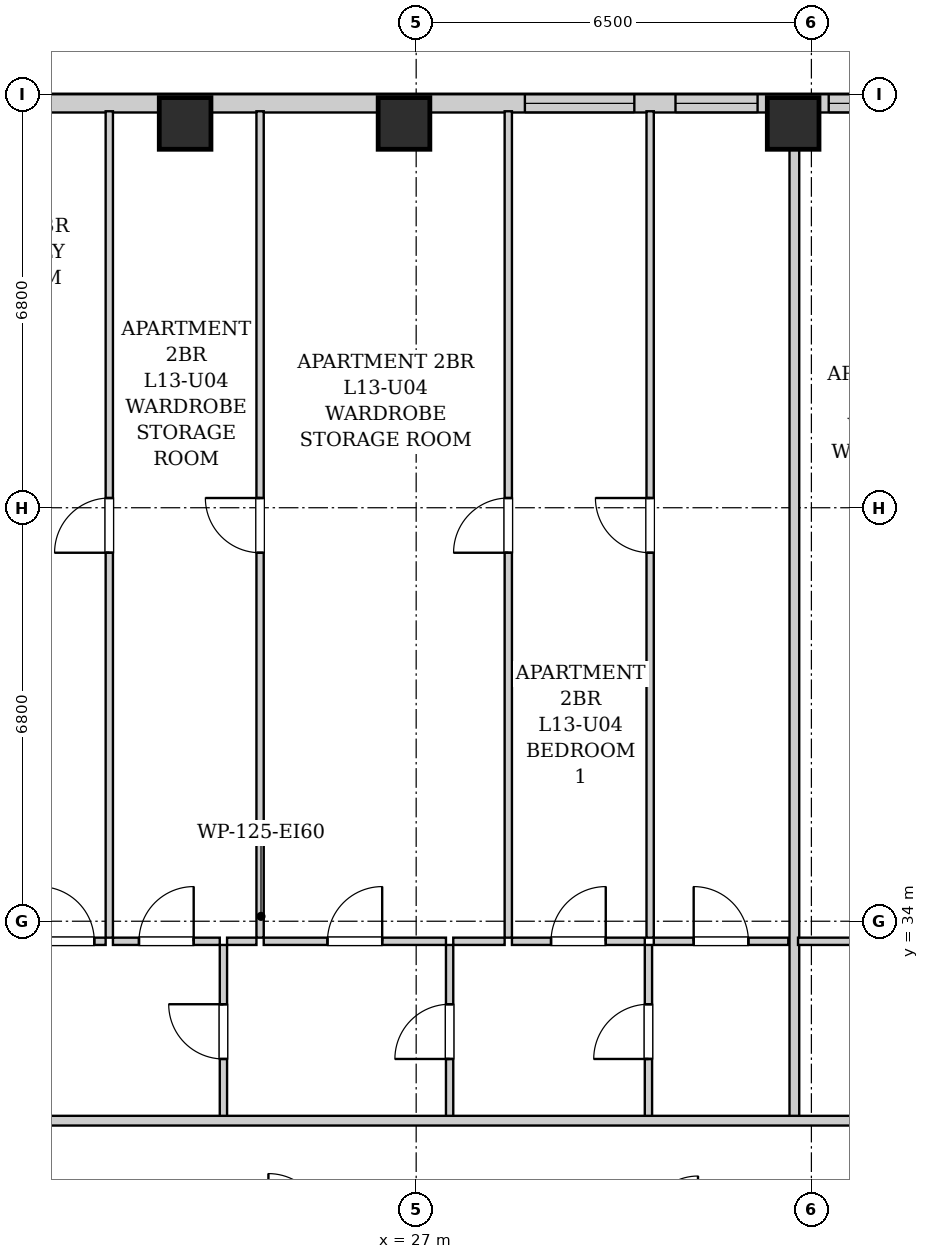
"""IFC4 building model, lengths in metres.
Left out: names, types, materials, properties, quantities, classifications, styles, units other than length and angle.
Written with IfcOpenShell. Run it as: python <this file> out.ifc"""

import sys

from ifc_helpers import new_model, si_unit, direction, frame, frame_2d, origin, origin_2d, place, context, subcontext, project, spatial, rectangle, extrude, element, fill, save


model = new_model("IFC4")
c1 = context("Model", 3, precision=1e-05, world=origin(), true_north=direction((0.0, 1.0)))
c2 = subcontext(c1, "Body", "Model", "MODEL_VIEW")
j1 = project(units=[si_unit("LENGTHUNIT", "METRE"), si_unit("PLANEANGLEUNIT", "RADIAN")], contexts=[c1])
p1 = place(None, origin())
s1 = spatial("IfcSite", under=j1, at=p1, CompositionType="ELEMENT")
p2 = place(p1, origin())
s2 = spatial("IfcBuilding", under=s1, at=p2, CompositionType="ELEMENT")
p3 = place(p2, frame((0.0, 0.0, 51.4)))
s3 = spatial("IfcBuildingStorey", under=s2, at=p3, CompositionType="ELEMENT", Elevation=51.4)
for number, where, z_axis, x_axis in (
    (1, (23.2, 47.12, 0.0), (0.0, 0.0, 1.0), (1.0, 0.0, 0.0)),
    (2, (26.8, 47.12, 0.0), (0.0, 0.0, 1.0), (1.0, 0.0, 0.0)),
    (3, (33.2, 47.12, 0.0), (0.0, 0.0, 1.0), (1.0, 0.0, 0.0)),
):
    element("IfcColumn", number, at=place(p3, frame(where, z_axis=z_axis, x_axis=x_axis)), inside=s3, PredefinedType="COLUMN", context=c2, shape_type="SweptSolid", body=[
        extrude(rectangle(XDim=0.85, YDim=0.85, at=origin_2d()), origin(), (0.0, 0.0, 1.0), 3.2),
    ])
p4 = place(p3, frame((10.0, 47.45, 0.0), z_axis=(0.0, 0.0, 1.0), x_axis=(1.0, 0.0, 0.0)))
e4 = element("IfcWall", 4, at=p4, inside=s3, PredefinedType="SOLIDWALL", context=c2, shape_type="SweptSolid", body=[
    extrude(rectangle(XDim=26.15, YDim=0.3, at=frame_2d((13.075, 0.0))), origin(), (0.0, 0.0, 1.0), 1.975),
])
p5 = place(p4, frame((5.862, 0.0, 0.55)))
e5 = element("IfcOpeningElement", 5, at=p5, cuts=e4, PredefinedType="OPENING", context=c2, shape_type="SweptSolid", body=[
    extrude(rectangle(XDim=1.35, YDim=1.2, at=frame_2d((0.675, 0.6))), frame((0.0, 0.16, 0.0), z_axis=(0.0, -1.0, 0.0), x_axis=(1.0, 0.0, 0.0)), (0.0, 0.0, 1.0), 0.32),
])
p6 = place(p4, frame((8.944, 0.0, 0.55)))
e6 = element("IfcOpeningElement", 6, at=p6, cuts=e4, PredefinedType="OPENING", context=c2, shape_type="SweptSolid", body=[
    extrude(rectangle(XDim=1.8, YDim=1.2, at=frame_2d((0.9, 0.6))), frame((0.0, 0.16, 0.0), z_axis=(0.0, -1.0, 0.0), x_axis=(1.0, 0.0, 0.0)), (0.0, 0.0, 1.0), 0.32),
])
p7 = place(p4, frame((18.788, 0.0, 0.55)))
e7 = element("IfcOpeningElement", 7, at=p7, cuts=e4, PredefinedType="OPENING", context=c2, shape_type="SweptSolid", body=[
    extrude(rectangle(XDim=1.8, YDim=1.2, at=frame_2d((0.9, 0.6))), frame((0.0, 0.16, 0.0), z_axis=(0.0, -1.0, 0.0), x_axis=(1.0, 0.0, 0.0)), (0.0, 0.0, 1.0), 0.32),
])
p8 = place(p4, frame((21.265, 0.0, 0.55)))
e8 = element("IfcOpeningElement", 8, at=p8, cuts=e4, PredefinedType="OPENING", context=c2, shape_type="SweptSolid", body=[
    extrude(rectangle(XDim=1.35, YDim=1.2, at=frame_2d((0.675, 0.6))), frame((0.0, 0.16, 0.0), z_axis=(0.0, -1.0, 0.0), x_axis=(1.0, 0.0, 0.0)), (0.0, 0.0, 1.0), 0.32),
])
p9 = place(p4, frame((23.785, 0.0, 0.55)))
e9 = element("IfcOpeningElement", 9, at=p9, cuts=e4, PredefinedType="OPENING", context=c2, shape_type="SweptSolid", body=[
    extrude(rectangle(XDim=1.8, YDim=1.2, at=frame_2d((0.9, 0.6))), frame((0.0, 0.16, 0.0), z_axis=(0.0, -1.0, 0.0), x_axis=(1.0, 0.0, 0.0)), (0.0, 0.0, 1.0), 0.32),
])
p10 = place(p3, frame((23.83, 30.76, 0.0), z_axis=(0.0, 0.0, 1.0), x_axis=(0.0, 1.0, 0.0)))
e10 = element("IfcWall", 10, at=p10, inside=s3, PredefinedType="PARTITIONING", context=c2, shape_type="SweptSolid", body=[
    extrude(rectangle(XDim=2.85, YDim=0.12, at=frame_2d((1.425, 0.0))), origin(), (0.0, 0.0, 1.0), 2.94),
])
p11 = place(p10, frame((0.975, 0.0, 0.0)))
e11 = element("IfcOpeningElement", 11, at=p11, cuts=e10, PredefinedType="OPENING", context=c2, shape_type="SweptSolid", body=[
    extrude(rectangle(XDim=0.9, YDim=2.05, at=frame_2d((0.45, 1.025))), frame((0.0, 0.07, 0.0), z_axis=(0.0, -1.0, 0.0), x_axis=(1.0, 0.0, 0.0)), (0.0, 0.0, 1.0), 0.14),
])
p12 = place(p3, frame((20.62, 33.67, 0.0), z_axis=(0.0, 0.0, 1.0), x_axis=(1.0, 0.0, 0.0)))
e12 = element("IfcWall", 12, at=p12, inside=s3, PredefinedType="PARTITIONING", context=c2, shape_type="SweptSolid", body=[
    extrude(rectangle(XDim=1.273, YDim=0.12, at=frame_2d((0.636, 0.0))), origin(), (0.0, 0.0, 1.0), 2.94),
])
p13 = place(p12, frame((0.186, 0.0, 0.0)))
e13 = element("IfcOpeningElement", 13, at=p13, cuts=e12, PredefinedType="OPENING", context=c2, shape_type="SweptSolid", body=[
    extrude(rectangle(XDim=0.9, YDim=2.05, at=frame_2d((0.45, 1.025))), frame((0.0, 0.07, 0.0), z_axis=(0.0, -1.0, 0.0), x_axis=(1.0, 0.0, 0.0)), (0.0, 0.0, 1.0), 0.14),
])
p14 = place(p3, frame((22.013, 33.67, 0.0), z_axis=(0.0, 0.0, 1.0), x_axis=(1.0, 0.0, 0.0)))
e14 = element("IfcWall", 14, at=p14, inside=s3, PredefinedType="PARTITIONING", context=c2, shape_type="SweptSolid", body=[
    extrude(rectangle(XDim=1.757, YDim=0.12, at=frame_2d((0.878, 0.0))), origin(), (0.0, 0.0, 1.0), 2.94),
])
p15 = place(p14, frame((0.428, 0.0, 0.0)))
e15 = element("IfcOpeningElement", 15, at=p15, cuts=e14, PredefinedType="OPENING", context=c2, shape_type="SweptSolid", body=[
    extrude(rectangle(XDim=0.9, YDim=2.05, at=frame_2d((0.45, 1.025))), frame((0.0, 0.07, 0.0), z_axis=(0.0, -1.0, 0.0), x_axis=(1.0, 0.0, 0.0)), (0.0, 0.0, 1.0), 0.14),
])
p16 = place(p3, frame((27.55, 30.76, 0.0), z_axis=(0.0, 0.0, 1.0), x_axis=(0.0, 1.0, 0.0)))
e16 = element("IfcWall", 16, at=p16, inside=s3, PredefinedType="PARTITIONING", context=c2, shape_type="SweptSolid", body=[
    extrude(rectangle(XDim=2.85, YDim=0.12, at=frame_2d((1.425, 0.0))), origin(), (0.0, 0.0, 1.0), 2.94),
])
p17 = place(p16, frame((0.975, 0.0, 0.0)))
e17 = element("IfcOpeningElement", 17, at=p17, cuts=e16, PredefinedType="OPENING", context=c2, shape_type="SweptSolid", body=[
    extrude(rectangle(XDim=0.9, YDim=2.05, at=frame_2d((0.45, 1.025))), frame((0.0, 0.07, 0.0), z_axis=(0.0, -1.0, 0.0), x_axis=(1.0, 0.0, 0.0)), (0.0, 0.0, 1.0), 0.14),
])
p18 = place(p3, frame((23.89, 33.67, 0.0), z_axis=(0.0, 0.0, 1.0), x_axis=(1.0, 0.0, 0.0)))
e18 = element("IfcWall", 18, at=p18, inside=s3, PredefinedType="PARTITIONING", context=c2, shape_type="SweptSolid", body=[
    extrude(rectangle(XDim=0.483, YDim=0.12, at=frame_2d((0.242, 0.0))), origin(), (0.0, 0.0, 1.0), 2.94),
])
p19 = place(p3, frame((24.493, 33.67, 0.0), z_axis=(0.0, 0.0, 1.0), x_axis=(1.0, 0.0, 0.0)))
e19 = element("IfcWall", 19, at=p19, inside=s3, PredefinedType="PARTITIONING", context=c2, shape_type="SweptSolid", body=[
    extrude(rectangle(XDim=2.997, YDim=0.12, at=frame_2d((1.499, 0.0))), origin(), (0.0, 0.0, 1.0), 2.94),
])
p20 = place(p19, frame((1.048, 0.0, 0.0)))
e20 = element("IfcOpeningElement", 20, at=p20, cuts=e19, PredefinedType="OPENING", context=c2, shape_type="SweptSolid", body=[
    extrude(rectangle(XDim=0.9, YDim=2.05, at=frame_2d((0.45, 1.025))), frame((0.0, 0.07, 0.0), z_axis=(0.0, -1.0, 0.0), x_axis=(1.0, 0.0, 0.0)), (0.0, 0.0, 1.0), 0.14),
])
p21 = place(p3, frame((30.82, 30.76, 0.0), z_axis=(0.0, 0.0, 1.0), x_axis=(0.0, 1.0, 0.0)))
e21 = element("IfcWall", 21, at=p21, inside=s3, PredefinedType="PARTITIONING", context=c2, shape_type="SweptSolid", body=[
    extrude(rectangle(XDim=2.85, YDim=0.12, at=frame_2d((1.425, 0.0))), origin(), (0.0, 0.0, 1.0), 2.94),
])
p22 = place(p21, frame((0.975, 0.0, 0.0)))
e22 = element("IfcOpeningElement", 22, at=p22, cuts=e21, PredefinedType="OPENING", context=c2, shape_type="SweptSolid", body=[
    extrude(rectangle(XDim=0.9, YDim=2.05, at=frame_2d((0.45, 1.025))), frame((0.0, 0.07, 0.0), z_axis=(0.0, -1.0, 0.0), x_axis=(1.0, 0.0, 0.0)), (0.0, 0.0, 1.0), 0.14),
])
p23 = place(p3, frame((27.61, 33.67, 0.0), z_axis=(0.0, 0.0, 1.0), x_axis=(1.0, 0.0, 0.0)))
e23 = element("IfcWall", 23, at=p23, inside=s3, PredefinedType="PARTITIONING", context=c2, shape_type="SweptSolid", body=[
    extrude(rectangle(XDim=0.845, YDim=0.12, at=frame_2d((0.422, 0.0))), origin(), (0.0, 0.0, 1.0), 2.94),
])
p24 = place(p3, frame((28.575, 33.67, 0.0), z_axis=(0.0, 0.0, 1.0), x_axis=(1.0, 0.0, 0.0)))
e24 = element("IfcWall", 24, at=p24, inside=s3, PredefinedType="PARTITIONING", context=c2, shape_type="SweptSolid", body=[
    extrude(rectangle(XDim=2.185, YDim=0.12, at=frame_2d((1.093, 0.0))), origin(), (0.0, 0.0, 1.0), 2.94),
])
p25 = place(p24, frame((0.643, 0.0, 0.0)))
e25 = element("IfcOpeningElement", 25, at=p25, cuts=e24, PredefinedType="OPENING", context=c2, shape_type="SweptSolid", body=[
    extrude(rectangle(XDim=0.9, YDim=2.05, at=frame_2d((0.45, 1.025))), frame((0.0, 0.07, 0.0), z_axis=(0.0, -1.0, 0.0), x_axis=(1.0, 0.0, 0.0)), (0.0, 0.0, 1.0), 0.14),
])
p26 = place(p3, frame((30.908, 33.67, 0.0), z_axis=(0.0, 0.0, 1.0), x_axis=(1.0, 0.0, 0.0)))
e26 = element("IfcWall", 26, at=p26, inside=s3, PredefinedType="PARTITIONING", context=c2, shape_type="SweptSolid", body=[
    extrude(rectangle(XDim=2.212, YDim=0.12, at=frame_2d((1.106, 0.0))), origin(), (0.0, 0.0, 1.0), 2.94),
])
p27 = place(p26, frame((0.656, 0.0, 0.0)))
e27 = element("IfcOpeningElement", 27, at=p27, cuts=e26, PredefinedType="OPENING", context=c2, shape_type="SweptSolid", body=[
    extrude(rectangle(XDim=0.9, YDim=2.05, at=frame_2d((0.45, 1.025))), frame((0.0, 0.07, 0.0), z_axis=(0.0, -1.0, 0.0), x_axis=(1.0, 0.0, 0.0)), (0.0, 0.0, 1.0), 0.14),
])
p28 = place(p3, frame((21.953, 33.73, 0.0), z_axis=(0.0, 0.0, 1.0), x_axis=(0.0, 1.0, 0.0)))
e28 = element("IfcWall", 28, at=p28, inside=s3, PredefinedType="PARTITIONING", context=c2, shape_type="SweptSolid", body=[
    extrude(rectangle(XDim=13.59, YDim=0.12, at=frame_2d((6.795, 0.0))), origin(), (0.0, 0.0, 1.0), 2.94),
])
p29 = place(p28, frame((6.33, 0.0, 0.0)))
e29 = element("IfcOpeningElement", 29, at=p29, cuts=e28, PredefinedType="OPENING", context=c2, shape_type="SweptSolid", body=[
    extrude(rectangle(XDim=0.9, YDim=2.05, at=frame_2d((0.45, 1.025))), frame((0.0, 0.07, 0.0), z_axis=(0.0, -1.0, 0.0), x_axis=(1.0, 0.0, 0.0)), (0.0, 0.0, 1.0), 0.14),
])
p30 = place(p3, frame((24.433, 33.73, 0.0), z_axis=(0.0, 0.0, 1.0), x_axis=(0.0, 1.0, 0.0)))
e30 = element("IfcWall", 30, at=p30, inside=s3, PredefinedType="PARTITIONING", context=c2, shape_type="SweptSolid", body=[
    extrude(rectangle(XDim=13.59, YDim=0.12, at=frame_2d((6.795, 0.0))), origin(), (0.0, 0.0, 1.0), 2.94),
])
p31 = place(p30, frame((6.33, 0.0, 0.0)))
e31 = element("IfcOpeningElement", 31, at=p31, cuts=e30, PredefinedType="OPENING", context=c2, shape_type="SweptSolid", body=[
    extrude(rectangle(XDim=0.9, YDim=2.05, at=frame_2d((0.45, 1.025))), frame((0.0, 0.07, 0.0), z_axis=(0.0, -1.0, 0.0), x_axis=(1.0, 0.0, 0.0)), (0.0, 0.0, 1.0), 0.14),
])
p32 = place(p3, frame((28.515, 33.73, 0.0), z_axis=(0.0, 0.0, 1.0), x_axis=(0.0, 1.0, 0.0)))
e32 = element("IfcWall", 32, at=p32, inside=s3, PredefinedType="PARTITIONING", context=c2, shape_type="SweptSolid", body=[
    extrude(rectangle(XDim=13.59, YDim=0.12, at=frame_2d((6.795, 0.0))), origin(), (0.0, 0.0, 1.0), 2.94),
])
p33 = place(p32, frame((6.33, 0.0, 0.0)))
e33 = element("IfcOpeningElement", 33, at=p33, cuts=e32, PredefinedType="OPENING", context=c2, shape_type="SweptSolid", body=[
    extrude(rectangle(XDim=0.9, YDim=2.05, at=frame_2d((0.45, 1.025))), frame((0.0, 0.07, 0.0), z_axis=(0.0, -1.0, 0.0), x_axis=(1.0, 0.0, 0.0)), (0.0, 0.0, 1.0), 0.14),
])
p34 = place(p3, frame((30.848, 33.73, 0.0), z_axis=(0.0, 0.0, 1.0), x_axis=(0.0, 1.0, 0.0)))
e34 = element("IfcWall", 34, at=p34, inside=s3, PredefinedType="PARTITIONING", context=c2, shape_type="SweptSolid", body=[
    extrude(rectangle(XDim=13.59, YDim=0.12, at=frame_2d((6.795, 0.0))), origin(), (0.0, 0.0, 1.0), 2.94),
])
p35 = place(p34, frame((6.33, 0.0, 0.0)))
e35 = element("IfcOpeningElement", 35, at=p35, cuts=e34, PredefinedType="OPENING", context=c2, shape_type="SweptSolid", body=[
    extrude(rectangle(XDim=0.9, YDim=2.05, at=frame_2d((0.45, 1.025))), frame((0.0, 0.07, 0.0), z_axis=(0.0, -1.0, 0.0), x_axis=(1.0, 0.0, 0.0)), (0.0, 0.0, 1.0), 0.14),
])
p36 = place(p3, frame((33.22, 30.76, 0.0), z_axis=(0.0, 0.0, 1.0), x_axis=(0.0, 1.0, 0.0)))
e36 = element("IfcWall", 36, at=p36, inside=s3, PredefinedType="PARTITIONING", context=c2, shape_type="SweptSolid", body=[
    extrude(rectangle(XDim=16.56, YDim=0.16, at=frame_2d((8.28, 0.0))), origin(), (0.0, 0.0, 1.0), 2.232),
])
p37 = place(p3, frame((33.28, 33.67, 0.0), z_axis=(0.0, 0.0, 1.0), x_axis=(1.0, 0.0, 0.0)))
e37 = element("IfcWall", 37, at=p37, inside=s3, PredefinedType="PARTITIONING", context=c2, shape_type="SweptSolid", body=[
    extrude(rectangle(XDim=2.4, YDim=0.12, at=frame_2d((1.2, 0.0))), origin(), (0.0, 0.0, 1.0), 2.94),
])
p38 = place(p3, frame((10.05, 30.72, 0.0), z_axis=(0.0, 0.0, 1.0), x_axis=(1.0, 0.0, 0.0)))
e38 = element("IfcWall", 38, at=p38, inside=s3, PredefinedType="PARTITIONING", context=c2, shape_type="SweptSolid", body=[
    extrude(rectangle(XDim=33.9, YDim=0.16, at=frame_2d((16.95, 0.0))), origin(), (0.0, 0.0, 1.0), 2.94),
])
p39 = place(p38, frame((4.165, 0.0, 0.0)))
e39 = element("IfcOpeningElement", 39, at=p39, cuts=e38, PredefinedType="OPENING", context=c2, shape_type="SweptSolid", body=[
    extrude(rectangle(XDim=0.95, YDim=2.1, at=frame_2d((0.475, 1.05))), frame((0.0, 0.09, 0.0), z_axis=(0.0, -1.0, 0.0), x_axis=(1.0, 0.0, 0.0)), (0.0, 0.0, 1.0), 0.18),
])
p40 = place(p38, frame((27.495, 0.0, 0.0)))
e40 = element("IfcOpeningElement", 40, at=p40, cuts=e38, PredefinedType="OPENING", context=c2, shape_type="SweptSolid", body=[
    extrude(rectangle(XDim=0.95, YDim=2.1, at=frame_2d((0.475, 1.05))), frame((0.0, 0.09, 0.0), z_axis=(0.0, -1.0, 0.0), x_axis=(1.0, 0.0, 0.0)), (0.0, 0.0, 1.0), 0.18),
])
p41 = place(p11, origin())
e41 = element("IfcDoor", 41, at=p41, inside=s3, OperationType="SINGLE_SWING_RIGHT", PredefinedType="DOOR", context=c2, shape_type="SweptSolid", body=[
    extrude(rectangle(XDim=0.9, YDim=2.05, at=frame_2d((0.45, 1.025))), frame((0.0, 0.025, 0.0), z_axis=(0.0, -1.0, 0.0), x_axis=(1.0, 0.0, 0.0)), (0.0, 0.0, 1.0), 0.05),
])
fill(e11, e41)
p42 = place(p13, origin())
e42 = element("IfcDoor", 42, at=p42, inside=s3, OperationType="SINGLE_SWING_LEFT", PredefinedType="DOOR", context=c2, shape_type="SweptSolid", body=[
    extrude(rectangle(XDim=0.9, YDim=2.05, at=frame_2d((0.45, 1.025))), frame((0.0, 0.025, 0.0), z_axis=(0.0, -1.0, 0.0), x_axis=(1.0, 0.0, 0.0)), (0.0, 0.0, 1.0), 0.05),
])
fill(e13, e42)
p43 = place(p15, origin())
e43 = element("IfcDoor", 43, at=p43, inside=s3, OperationType="SINGLE_SWING_RIGHT", PredefinedType="DOOR", context=c2, shape_type="SweptSolid", body=[
    extrude(rectangle(XDim=0.9, YDim=2.05, at=frame_2d((0.45, 1.025))), frame((0.0, 0.025, 0.0), z_axis=(0.0, -1.0, 0.0), x_axis=(1.0, 0.0, 0.0)), (0.0, 0.0, 1.0), 0.05),
])
fill(e15, e43)
p44 = place(p17, origin())
e44 = element("IfcDoor", 44, at=p44, inside=s3, OperationType="SINGLE_SWING_LEFT", PredefinedType="DOOR", context=c2, shape_type="SweptSolid", body=[
    extrude(rectangle(XDim=0.9, YDim=2.05, at=frame_2d((0.45, 1.025))), frame((0.0, 0.025, 0.0), z_axis=(0.0, -1.0, 0.0), x_axis=(1.0, 0.0, 0.0)), (0.0, 0.0, 1.0), 0.05),
])
fill(e17, e44)
p45 = place(p20, origin())
e45 = element("IfcDoor", 45, at=p45, inside=s3, OperationType="SINGLE_SWING_RIGHT", PredefinedType="DOOR", context=c2, shape_type="SweptSolid", body=[
    extrude(rectangle(XDim=0.9, YDim=2.05, at=frame_2d((0.45, 1.025))), frame((0.0, 0.025, 0.0), z_axis=(0.0, -1.0, 0.0), x_axis=(1.0, 0.0, 0.0)), (0.0, 0.0, 1.0), 0.05),
])
fill(e20, e45)
p46 = place(p22, origin())
e46 = element("IfcDoor", 46, at=p46, inside=s3, OperationType="SINGLE_SWING_LEFT", PredefinedType="DOOR", context=c2, shape_type="SweptSolid", body=[
    extrude(rectangle(XDim=0.9, YDim=2.05, at=frame_2d((0.45, 1.025))), frame((0.0, 0.025, 0.0), z_axis=(0.0, -1.0, 0.0), x_axis=(1.0, 0.0, 0.0)), (0.0, 0.0, 1.0), 0.05),
])
fill(e22, e46)
p47 = place(p25, origin())
e47 = element("IfcDoor", 47, at=p47, inside=s3, OperationType="SINGLE_SWING_RIGHT", PredefinedType="DOOR", context=c2, shape_type="SweptSolid", body=[
    extrude(rectangle(XDim=0.9, YDim=2.05, at=frame_2d((0.45, 1.025))), frame((0.0, 0.025, 0.0), z_axis=(0.0, -1.0, 0.0), x_axis=(1.0, 0.0, 0.0)), (0.0, 0.0, 1.0), 0.05),
])
fill(e25, e47)
p48 = place(p27, origin())
e48 = element("IfcDoor", 48, at=p48, inside=s3, OperationType="SINGLE_SWING_LEFT", PredefinedType="DOOR", context=c2, shape_type="SweptSolid", body=[
    extrude(rectangle(XDim=0.9, YDim=2.05, at=frame_2d((0.45, 1.025))), frame((0.0, 0.025, 0.0), z_axis=(0.0, -1.0, 0.0), x_axis=(1.0, 0.0, 0.0)), (0.0, 0.0, 1.0), 0.05),
])
fill(e27, e48)
p49 = place(p29, origin())
e49 = element("IfcDoor", 49, at=p49, inside=s3, OperationType="SINGLE_SWING_LEFT", PredefinedType="DOOR", context=c2, shape_type="SweptSolid", body=[
    extrude(rectangle(XDim=0.9, YDim=2.05, at=frame_2d((0.45, 1.025))), frame((0.0, 0.025, 0.0), z_axis=(0.0, -1.0, 0.0), x_axis=(1.0, 0.0, 0.0)), (0.0, 0.0, 1.0), 0.05),
])
fill(e29, e49)
p50 = place(p31, origin())
e50 = element("IfcDoor", 50, at=p50, inside=s3, OperationType="SINGLE_SWING_RIGHT", PredefinedType="DOOR", context=c2, shape_type="SweptSolid", body=[
    extrude(rectangle(XDim=0.9, YDim=2.05, at=frame_2d((0.45, 1.025))), frame((0.0, 0.025, 0.0), z_axis=(0.0, -1.0, 0.0), x_axis=(1.0, 0.0, 0.0)), (0.0, 0.0, 1.0), 0.05),
])
fill(e31, e50)
p51 = place(p33, origin())
e51 = element("IfcDoor", 51, at=p51, inside=s3, OperationType="SINGLE_SWING_LEFT", PredefinedType="DOOR", context=c2, shape_type="SweptSolid", body=[
    extrude(rectangle(XDim=0.9, YDim=2.05, at=frame_2d((0.45, 1.025))), frame((0.0, 0.025, 0.0), z_axis=(0.0, -1.0, 0.0), x_axis=(1.0, 0.0, 0.0)), (0.0, 0.0, 1.0), 0.05),
])
fill(e33, e51)
p52 = place(p35, origin())
e52 = element("IfcDoor", 52, at=p52, inside=s3, OperationType="SINGLE_SWING_RIGHT", PredefinedType="DOOR", context=c2, shape_type="SweptSolid", body=[
    extrude(rectangle(XDim=0.9, YDim=2.05, at=frame_2d((0.45, 1.025))), frame((0.0, 0.025, 0.0), z_axis=(0.0, -1.0, 0.0), x_axis=(1.0, 0.0, 0.0)), (0.0, 0.0, 1.0), 0.05),
])
fill(e35, e52)
p53 = place(p7, origin())
e53 = element("IfcWindow", 53, at=p53, inside=s3, PartitioningType="DOUBLE_PANEL_VERTICAL", PredefinedType="WINDOW", context=c2, shape_type="SweptSolid", body=[
    extrude(rectangle(XDim=1.8, YDim=1.2, at=frame_2d((0.9, 0.6))), frame((0.0, 0.03, 0.0), z_axis=(0.0, -1.0, 0.0), x_axis=(1.0, 0.0, 0.0)), (0.0, 0.0, 1.0), 0.06),
])
fill(e7, e53)
p54 = place(p8, origin())
e54 = element("IfcWindow", 54, at=p54, inside=s3, PartitioningType="SINGLE_PANEL", PredefinedType="WINDOW", context=c2, shape_type="SweptSolid", body=[
    extrude(rectangle(XDim=1.35, YDim=1.2, at=frame_2d((0.675, 0.6))), frame((0.0, 0.03, 0.0), z_axis=(0.0, -1.0, 0.0), x_axis=(1.0, 0.0, 0.0)), (0.0, 0.0, 1.0), 0.06),
])
fill(e8, e54)
p55 = place(p9, origin())
e55 = element("IfcWindow", 55, at=p55, inside=s3, PartitioningType="DOUBLE_PANEL_VERTICAL", PredefinedType="WINDOW", context=c2, shape_type="SweptSolid", body=[
    extrude(rectangle(XDim=1.8, YDim=1.2, at=frame_2d((0.9, 0.6))), frame((0.0, 0.03, 0.0), z_axis=(0.0, -1.0, 0.0), x_axis=(1.0, 0.0, 0.0)), (0.0, 0.0, 1.0), 0.06),
])
fill(e9, e55)
save(model, sys.argv[1])
